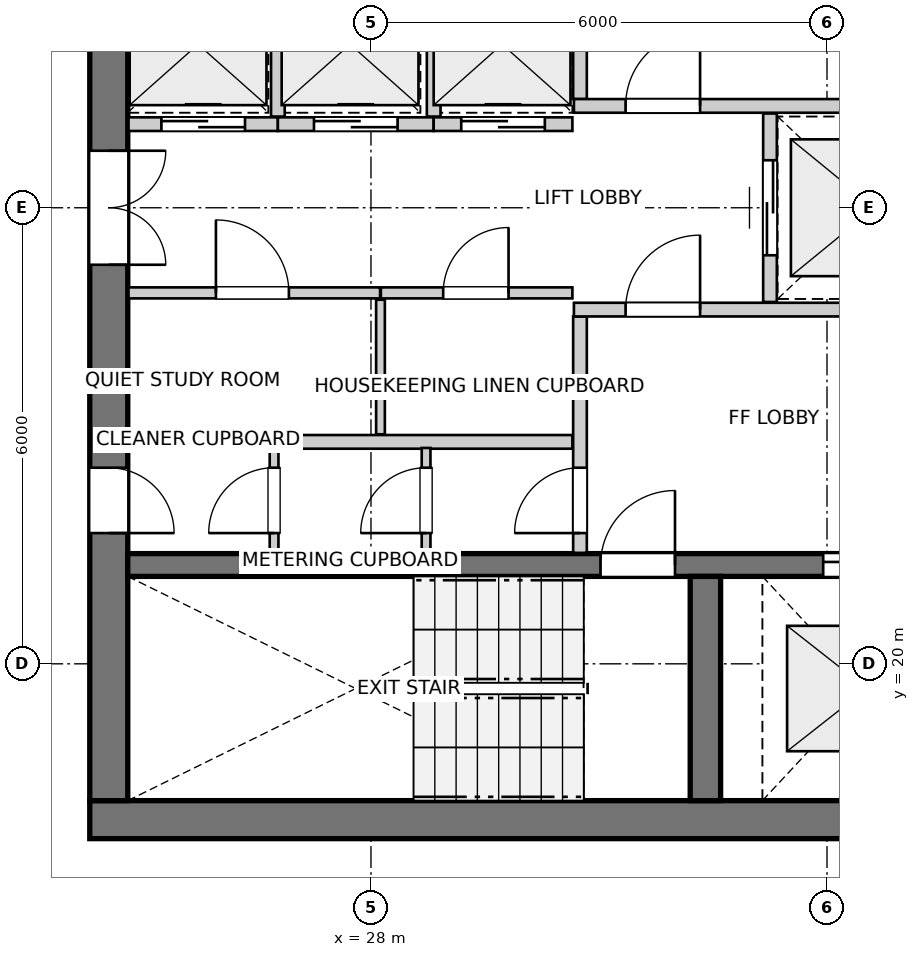
"""IFC4 building model, lengths in metres.
Left out: names, types, materials, properties, quantities, classifications, styles, units other than length and angle.
Written with IfcOpenShell. Run it as: python <this file> out.ifc"""

import sys

from ifc_helpers import new_model, si_unit, direction, frame, frame_2d, origin, place, context, subcontext, project, spatial, rectangle, extrude, source, transform, mapped, element, fill, save


model = new_model("IFC4")
c1 = context("Model", 3, precision=1e-05, world=origin(), true_north=direction((0.0, 1.0)))
c2 = subcontext(c1, "Body", "Model", "MODEL_VIEW")
j1 = project(units=[si_unit("LENGTHUNIT", "METRE"), si_unit("PLANEANGLEUNIT", "RADIAN")], contexts=[c1])
p1 = place(None, origin())
s1 = spatial("IfcSite", under=j1, at=p1, CompositionType="ELEMENT")
p2 = place(p1, origin())
s2 = spatial("IfcBuilding", under=s1, at=p2, CompositionType="ELEMENT")
p3 = place(p2, frame((0.0, 0.0, 246.8)))
s3 = spatial("IfcBuildingStorey", under=s2, at=p3, CompositionType="ELEMENT", Elevation=246.8)
p4 = place(p3, frame((24.3, 17.95, 0.0), z_axis=(0.0, 0.0, 1.0), x_axis=(1.0, 0.0, 0.0)))
e1 = element("IfcWall", 1, at=p4, inside=s3, PredefinedType="SHEAR", context=c2, shape_type="SweptSolid", body=[
    extrude(rectangle(XDim=12.1, YDim=0.5, at=frame_2d((6.05, 0.0))), origin(), (0.0, 0.0, 1.0), 2.96),
])
p5 = place(p3, frame((24.55, 33.8, 0.0), z_axis=(0.0, 0.0, 1.0), x_axis=(0.0, -1.0, 0.0)))
e2 = element("IfcWall", 2, at=p5, inside=s3, PredefinedType="SHEAR", context=c2, shape_type="SweptSolid", body=[
    extrude(rectangle(XDim=15.6, YDim=0.5, at=frame_2d((7.8, 0.0))), origin(), (0.0, 0.0, 1.0), 2.96),
])
p6 = place(p5, frame((7.05, 0.0, 0.0)))
e3 = element("IfcOpeningElement", 3, at=p6, cuts=e2, PredefinedType="OPENING", context=c2, shape_type="SweptSolid", body=[
    extrude(rectangle(XDim=1.5, YDim=2.15, at=frame_2d((0.75, 1.075))), frame((0.0, 0.26, 0.0), z_axis=(0.0, -1.0, 0.0), x_axis=(1.0, 0.0, 0.0)), (0.0, 0.0, 1.0), 0.52),
])
p7 = place(p5, frame((3.52, 0.0, 0.0)))
e4 = element("IfcOpeningElement", 4, at=p7, cuts=e2, PredefinedType="OPENING", context=c2, shape_type="SweptSolid", body=[
    extrude(rectangle(XDim=0.86, YDim=2.05, at=frame_2d((0.43, 1.025))), frame((0.0, 0.26, 0.0), z_axis=(0.0, -1.0, 0.0), x_axis=(1.0, 0.0, 0.0)), (0.0, 0.0, 1.0), 0.52),
])
p8 = place(p5, frame((11.22, 0.0, 0.0)))
e5 = element("IfcOpeningElement", 5, at=p8, cuts=e2, PredefinedType="OPENING", context=c2, shape_type="SweptSolid", body=[
    extrude(rectangle(XDim=0.86, YDim=2.05, at=frame_2d((0.43, 1.025))), frame((0.0, 0.26, 0.0), z_axis=(0.0, -1.0, 0.0), x_axis=(1.0, 0.0, 0.0)), (0.0, 0.0, 1.0), 0.52),
])
p9 = place(p3, frame((24.8, 21.3, 0.0), z_axis=(0.0, 0.0, 1.0), x_axis=(1.0, 0.0, 0.0)))
e6 = element("IfcWall", 6, at=p9, inside=s3, PredefinedType="SHEAR", context=c2, shape_type="SweptSolid", body=[
    extrude(rectangle(XDim=11.1, YDim=0.3, at=frame_2d((5.55, 0.0))), origin(), (0.0, 0.0, 1.0), 2.96),
])
p10 = place(p9, frame((6.22, 0.0, 0.0)))
e7 = element("IfcOpeningElement", 7, at=p10, cuts=e6, PredefinedType="OPENING", context=c2, shape_type="SweptSolid", body=[
    extrude(rectangle(XDim=0.98, YDim=2.15, at=frame_2d((0.49, 1.075))), frame((0.0, 0.16, 0.0), z_axis=(0.0, -1.0, 0.0), x_axis=(1.0, 0.0, 0.0)), (0.0, 0.0, 1.0), 0.32),
])
p11 = place(p9, frame((9.15, 0.0, 0.0)))
e8 = element("IfcOpeningElement", 8, at=p11, cuts=e6, PredefinedType="OPENING", context=c2, shape_type="SweptSolid", body=[
    extrude(rectangle(XDim=1.15, YDim=2.15, at=frame_2d((0.575, 1.075))), frame((0.0, 0.16, 0.0), z_axis=(0.0, -1.0, 0.0), x_axis=(1.0, 0.0, 0.0)), (0.0, 0.0, 1.0), 0.32),
])
p12 = place(p3, frame((32.4, 18.2, 0.0), z_axis=(0.0, 0.0, 1.0), x_axis=(0.0, 1.0, 0.0)))
e9 = element("IfcWall", 9, at=p12, inside=s3, PredefinedType="SHEAR", context=c2, shape_type="SweptSolid", body=[
    extrude(rectangle(XDim=2.95, YDim=0.4, at=frame_2d((1.475, 0.0))), origin(), (0.0, 0.0, 1.0), 2.96),
])
p13 = place(p3, frame((30.75, 21.46, 0.0), z_axis=(0.0, 0.0, 1.0), x_axis=(0.0, 1.0, 0.0)))
e10 = element("IfcWall", 10, at=p13, inside=s3, PredefinedType="PARTITIONING", context=c2, shape_type="SweptSolid", body=[
    extrude(rectangle(XDim=3.11, YDim=0.18, at=frame_2d((1.555, 0.0))), origin(), (0.0, 0.0, 1.0), 2.96),
])
p14 = place(p13, frame((0.26, 0.0, 0.0)))
e11 = element("IfcOpeningElement", 11, at=p14, cuts=e10, PredefinedType="OPENING", context=c2, shape_type="SweptSolid", body=[
    extrude(rectangle(XDim=0.86, YDim=2.05, at=frame_2d((0.43, 1.025))), frame((0.0, 0.1, 0.0), z_axis=(0.0, -1.0, 0.0), x_axis=(1.0, 0.0, 0.0)), (0.0, 0.0, 1.0), 0.2),
])
p15 = place(p3, frame((30.67, 24.66, 0.0), z_axis=(0.0, 0.0, 1.0), x_axis=(1.0, 0.0, 0.0)))
e12 = element("IfcWall", 12, at=p15, inside=s3, PredefinedType="PARTITIONING", context=c2, shape_type="SweptSolid", body=[
    extrude(rectangle(XDim=5.22, YDim=0.18, at=frame_2d((2.61, 0.0))), origin(), (0.0, 0.0, 1.0), 2.96),
])
p16 = place(p15, frame((0.68, 0.0, 0.0)))
e13 = element("IfcOpeningElement", 13, at=p16, cuts=e12, PredefinedType="OPENING", context=c2, shape_type="SweptSolid", body=[
    extrude(rectangle(XDim=0.98, YDim=2.15, at=frame_2d((0.49, 1.075))), frame((0.0, 0.1, 0.0), z_axis=(0.0, -1.0, 0.0), x_axis=(1.0, 0.0, 0.0)), (0.0, 0.0, 1.0), 0.2),
])
p17 = place(p3, frame((30.75, 27.43, 0.0), z_axis=(0.0, 0.0, 1.0), x_axis=(0.0, 1.0, 0.0)))
e14 = element("IfcWall", 14, at=p17, inside=s3, PredefinedType="PARTITIONING", context=c2, shape_type="SweptSolid", body=[
    extrude(rectangle(XDim=3.11, YDim=0.18, at=frame_2d((1.555, 0.0))), origin(), (0.0, 0.0, 1.0), 2.96),
])
p18 = place(p17, frame((1.98, 0.0, 0.0)))
e15 = element("IfcOpeningElement", 15, at=p18, cuts=e14, PredefinedType="OPENING", context=c2, shape_type="SweptSolid", body=[
    extrude(rectangle(XDim=0.86, YDim=2.05, at=frame_2d((0.43, 1.025))), frame((0.0, 0.1, 0.0), z_axis=(0.0, -1.0, 0.0), x_axis=(1.0, 0.0, 0.0)), (0.0, 0.0, 1.0), 0.2),
])
p19 = place(p3, frame((30.67, 27.34, 0.0), z_axis=(0.0, 0.0, 1.0), x_axis=(1.0, 0.0, 0.0)))
e16 = element("IfcWall", 16, at=p19, inside=s3, PredefinedType="PARTITIONING", context=c2, shape_type="SweptSolid", body=[
    extrude(rectangle(XDim=5.22, YDim=0.18, at=frame_2d((2.61, 0.0))), origin(), (0.0, 0.0, 1.0), 2.96),
])
p20 = place(p19, frame((0.68, 0.0, 0.0)))
e17 = element("IfcOpeningElement", 17, at=p20, cuts=e16, PredefinedType="OPENING", context=c2, shape_type="SweptSolid", body=[
    extrude(rectangle(XDim=0.98, YDim=2.15, at=frame_2d((0.49, 1.075))), frame((0.0, 0.1, 0.0), z_axis=(0.0, -1.0, 0.0), x_axis=(1.0, 0.0, 0.0)), (0.0, 0.0, 1.0), 0.2),
])
p21 = place(p3, frame((33.25, 24.76, 0.0), z_axis=(0.0, 0.0, 1.0), x_axis=(0.0, 1.0, 0.0)))
e18 = element("IfcWall", 18, at=p21, inside=s3, PredefinedType="PARTITIONING", context=c2, shape_type="SweptSolid", body=[
    extrude(rectangle(XDim=2.48, YDim=0.18, at=frame_2d((1.24, 0.0))), origin(), (0.0, 0.0, 1.0), 2.96),
])
p22 = place(p21, frame((0.615, 0.0, 0.0)))
e19 = element("IfcOpeningElement", 19, at=p22, cuts=e18, PredefinedType="OPENING", context=c2, shape_type="SweptSolid", body=[
    extrude(rectangle(XDim=1.25, YDim=2.15, at=frame_2d((0.625, 1.075))), frame((0.0, 0.1, 0.0), z_axis=(0.0, -1.0, 0.0), x_axis=(1.0, 0.0, 0.0)), (0.0, 0.0, 1.0), 0.2),
])
p23 = place(p3, frame((24.81, 22.92, 0.0), z_axis=(0.0, 0.0, 1.0), x_axis=(1.0, 0.0, 0.0)))
e20 = element("IfcWall", 20, at=p23, inside=s3, PredefinedType="PARTITIONING", context=c2, shape_type="SweptSolid", body=[
    extrude(rectangle(XDim=5.84, YDim=0.18, at=frame_2d((2.92, 0.0))), origin(), (0.0, 0.0, 1.0), 2.96),
])
p24 = place(p3, frame((24.81, 24.88, 0.0), z_axis=(0.0, 0.0, 1.0), x_axis=(1.0, 0.0, 0.0)))
e21 = element("IfcWall", 21, at=p24, inside=s3, PredefinedType="PARTITIONING", context=c2, shape_type="SweptSolid", body=[
    extrude(rectangle(XDim=3.31, YDim=0.145, at=frame_2d((1.655, 0.0))), origin(), (0.0, 0.0, 1.0), 2.96),
])
p25 = place(p24, frame((1.15, 0.0, 0.0)))
e22 = element("IfcOpeningElement", 22, at=p25, cuts=e21, PredefinedType="OPENING", context=c2, shape_type="SweptSolid", body=[
    extrude(rectangle(XDim=0.96, YDim=2.1, at=frame_2d((0.48, 1.05))), frame((0.0, 0.083, 0.0), z_axis=(0.0, -1.0, 0.0), x_axis=(1.0, 0.0, 0.0)), (0.0, 0.0, 1.0), 0.165),
])
p26 = place(p3, frame((28.13, 24.88, 0.0), z_axis=(0.0, 0.0, 1.0), x_axis=(1.0, 0.0, 0.0)))
e23 = element("IfcWall", 23, at=p26, inside=s3, PredefinedType="PARTITIONING", context=c2, shape_type="SweptSolid", body=[
    extrude(rectangle(XDim=2.52, YDim=0.145, at=frame_2d((1.26, 0.0))), origin(), (0.0, 0.0, 1.0), 2.96),
])
p27 = place(p26, frame((0.82, 0.0, 0.0)))
e24 = element("IfcOpeningElement", 24, at=p27, cuts=e23, PredefinedType="OPENING", context=c2, shape_type="SweptSolid", body=[
    extrude(rectangle(XDim=0.86, YDim=2.05, at=frame_2d((0.43, 1.025))), frame((0.0, 0.083, 0.0), z_axis=(0.0, -1.0, 0.0), x_axis=(1.0, 0.0, 0.0)), (0.0, 0.0, 1.0), 0.165),
])
p28 = place(p3, frame((28.125, 23.02, 0.0), z_axis=(0.0, 0.0, 1.0), x_axis=(0.0, 1.0, 0.0)))
e25 = element("IfcWall", 25, at=p28, inside=s3, PredefinedType="PARTITIONING", context=c2, shape_type="SweptSolid", body=[
    extrude(rectangle(XDim=1.77, YDim=0.115, at=frame_2d((0.885, 0.0))), origin(), (0.0, 0.0, 1.0), 2.96),
])
p29 = place(p3, frame((24.81, 27.1, 0.0), z_axis=(0.0, 0.0, 1.0), x_axis=(1.0, 0.0, 0.0)))
e26 = element("IfcWall", 26, at=p29, inside=s3, PredefinedType="PARTITIONING", context=c2, shape_type="SweptSolid", body=[
    extrude(rectangle(XDim=1.965, YDim=0.18, at=frame_2d((0.982, 0.0))), origin(), (0.0, 0.0, 1.0), 2.96),
])
p30 = place(p29, frame((0.433, 0.0, 0.0)))
e27 = element("IfcOpeningElement", 27, at=p30, cuts=e26, PredefinedType="OPENING", context=c2, shape_type="SweptSolid", body=[
    extrude(rectangle(XDim=1.1, YDim=2.15, at=frame_2d((0.55, 1.075))), frame((0.0, 0.1, 0.0), z_axis=(0.0, -1.0, 0.0), x_axis=(1.0, 0.0, 0.0)), (0.0, 0.0, 1.0), 0.2),
])
p31 = place(p3, frame((26.775, 27.1, 0.0), z_axis=(0.0, 0.0, 1.0), x_axis=(1.0, 0.0, 0.0)))
e28 = element("IfcWall", 28, at=p31, inside=s3, PredefinedType="PARTITIONING", context=c2, shape_type="SweptSolid", body=[
    extrude(rectangle(XDim=2.05, YDim=0.18, at=frame_2d((1.025, 0.0))), origin(), (0.0, 0.0, 1.0), 2.96),
])
p32 = place(p31, frame((0.475, 0.0, 0.0)))
e29 = element("IfcOpeningElement", 29, at=p32, cuts=e28, PredefinedType="OPENING", context=c2, shape_type="SweptSolid", body=[
    extrude(rectangle(XDim=1.1, YDim=2.15, at=frame_2d((0.55, 1.075))), frame((0.0, 0.1, 0.0), z_axis=(0.0, -1.0, 0.0), x_axis=(1.0, 0.0, 0.0)), (0.0, 0.0, 1.0), 0.2),
])
p33 = place(p3, frame((26.775, 27.2, 0.0), z_axis=(0.0, 0.0, 1.0), x_axis=(0.0, 1.0, 0.0)))
e30 = element("IfcWall", 30, at=p33, inside=s3, PredefinedType="PARTITIONING", context=c2, shape_type="SweptSolid", body=[
    extrude(rectangle(XDim=1.78, YDim=0.18, at=frame_2d((0.89, 0.0))), origin(), (0.0, 0.0, 1.0), 2.96),
])
p34 = place(p3, frame((28.825, 27.1, 0.0), z_axis=(0.0, 0.0, 1.0), x_axis=(1.0, 0.0, 0.0)))
e31 = element("IfcWall", 31, at=p34, inside=s3, PredefinedType="PARTITIONING", context=c2, shape_type="SweptSolid", body=[
    extrude(rectangle(XDim=1.825, YDim=0.18, at=frame_2d((0.913, 0.0))), origin(), (0.0, 0.0, 1.0), 2.96),
])
p35 = place(p34, frame((0.363, 0.0, 0.0)))
e32 = element("IfcOpeningElement", 32, at=p35, cuts=e31, PredefinedType="OPENING", context=c2, shape_type="SweptSolid", body=[
    extrude(rectangle(XDim=1.1, YDim=2.15, at=frame_2d((0.55, 1.075))), frame((0.0, 0.1, 0.0), z_axis=(0.0, -1.0, 0.0), x_axis=(1.0, 0.0, 0.0)), (0.0, 0.0, 1.0), 0.2),
])
p36 = place(p3, frame((28.825, 27.2, 0.0), z_axis=(0.0, 0.0, 1.0), x_axis=(0.0, 1.0, 0.0)))
e33 = element("IfcWall", 33, at=p36, inside=s3, PredefinedType="PARTITIONING", context=c2, shape_type="SweptSolid", body=[
    extrude(rectangle(XDim=1.78, YDim=0.18, at=frame_2d((0.89, 0.0))), origin(), (0.0, 0.0, 1.0), 2.96),
])
p37 = place(p3, frame((26.725, 21.46, 0.0), z_axis=(0.0, 0.0, 1.0), x_axis=(0.0, 1.0, 0.0)))
e34 = element("IfcWall", 34, at=p37, inside=s3, PredefinedType="PARTITIONING", context=c2, shape_type="SweptSolid", body=[
    extrude(rectangle(XDim=1.38, YDim=0.115, at=frame_2d((0.69, 0.0))), origin(), (0.0, 0.0, 1.0), 2.96),
])
p38 = place(p37, frame((0.26, 0.0, 0.0)))
e35 = element("IfcOpeningElement", 35, at=p38, cuts=e34, PredefinedType="OPENING", context=c2, shape_type="SweptSolid", body=[
    extrude(rectangle(XDim=0.86, YDim=2.05, at=frame_2d((0.43, 1.025))), frame((0.0, 0.067, 0.0), z_axis=(0.0, -1.0, 0.0), x_axis=(1.0, 0.0, 0.0)), (0.0, 0.0, 1.0), 0.135),
])
p39 = place(p3, frame((28.725, 21.46, 0.0), z_axis=(0.0, 0.0, 1.0), x_axis=(0.0, 1.0, 0.0)))
e36 = element("IfcWall", 36, at=p39, inside=s3, PredefinedType="PARTITIONING", context=c2, shape_type="SweptSolid", body=[
    extrude(rectangle(XDim=1.38, YDim=0.115, at=frame_2d((0.69, 0.0))), origin(), (0.0, 0.0, 1.0), 2.96),
])
p40 = place(p39, frame((0.26, 0.0, 0.0)))
e37 = element("IfcOpeningElement", 37, at=p40, cuts=e36, PredefinedType="OPENING", context=c2, shape_type="SweptSolid", body=[
    extrude(rectangle(XDim=0.86, YDim=2.05, at=frame_2d((0.43, 1.025))), frame((0.0, 0.067, 0.0), z_axis=(0.0, -1.0, 0.0), x_axis=(1.0, 0.0, 0.0)), (0.0, 0.0, 1.0), 0.135),
])
m1 = source(origin(), c2, "Body", "SweptSolid", [
    extrude(rectangle(XDim=0.98, YDim=2.15, at=frame_2d((0.49, 1.075))), frame((0.0, 0.025, 0.0), z_axis=(0.0, -1.0, 0.0), x_axis=(1.0, 0.0, 0.0)), (0.0, 0.0, 1.0), 0.05),
])
p41 = place(p10, origin())
e38 = element("IfcDoor", 38, at=p41, inside=s3, OperationType="SINGLE_SWING_RIGHT", PredefinedType="DOOR", context=c2, shape_type="MappedRepresentation", body=[
    mapped(m1, transform((0.0, 0.0, 0.0), x_axis=(1.0, 0.0, 0.0), y_axis=(0.0, 1.0, 0.0), z_axis=(0.0, 0.0, 1.0), scale=1.0)),
])
fill(e7, e38)
m2 = source(origin(), c2, "Body", "SweptSolid", [
    extrude(rectangle(XDim=1.15, YDim=2.15, at=frame_2d((0.575, 1.075))), frame((0.0, 0.025, 0.0), z_axis=(0.0, -1.0, 0.0), x_axis=(1.0, 0.0, 0.0)), (0.0, 0.0, 1.0), 0.05),
])
p42 = place(p11, origin())
e39 = element("IfcDoor", 39, at=p42, inside=s3, OperationType="DOUBLE_DOOR_SLIDING", PredefinedType="DOOR", context=c2, shape_type="MappedRepresentation", body=[
    mapped(m2, transform((0.0, 0.0, 0.0), x_axis=(1.0, 0.0, 0.0), y_axis=(0.0, 1.0, 0.0), z_axis=(0.0, 0.0, 1.0), scale=1.0)),
])
fill(e8, e39)
m3 = source(origin(), c2, "Body", "SweptSolid", [
    extrude(rectangle(XDim=1.5, YDim=2.15, at=frame_2d((0.75, 1.075))), frame((0.0, 0.025, 0.0), z_axis=(0.0, -1.0, 0.0), x_axis=(1.0, 0.0, 0.0)), (0.0, 0.0, 1.0), 0.05),
])
p43 = place(p6, origin())
e40 = element("IfcDoor", 40, at=p43, inside=s3, OperationType="DOUBLE_DOOR_SINGLE_SWING", PredefinedType="DOOR", context=c2, shape_type="MappedRepresentation", body=[
    mapped(m3, transform((0.0, 0.0, 0.0), x_axis=(1.0, 0.0, 0.0), y_axis=(0.0, 1.0, 0.0), z_axis=(0.0, 0.0, 1.0), scale=1.0)),
])
fill(e3, e40)
m4 = source(origin(), c2, "Body", "SweptSolid", [
    extrude(rectangle(XDim=0.86, YDim=2.05, at=frame_2d((0.43, 1.025))), frame((0.0, 0.025, 0.0), z_axis=(0.0, -1.0, 0.0), x_axis=(1.0, 0.0, 0.0)), (0.0, 0.0, 1.0), 0.05),
])
p44 = place(p8, origin())
e41 = element("IfcDoor", 41, at=p44, inside=s3, OperationType="SINGLE_SWING_RIGHT", PredefinedType="DOOR", context=c2, shape_type="MappedRepresentation", body=[
    mapped(m4, transform((0.0, 0.0, 0.0), x_axis=(1.0, 0.0, 0.0), y_axis=(0.0, 1.0, 0.0), z_axis=(0.0, 0.0, 1.0), scale=1.0)),
])
fill(e5, e41)
p45 = place(p14, origin())
e42 = element("IfcDoor", 42, at=p45, inside=s3, OperationType="SINGLE_SWING_LEFT", PredefinedType="DOOR", context=c2, shape_type="MappedRepresentation", body=[
    mapped(m4, transform((0.0, 0.0, 0.0), x_axis=(1.0, 0.0, 0.0), y_axis=(0.0, 1.0, 0.0), z_axis=(0.0, 0.0, 1.0), scale=1.0)),
])
fill(e11, e42)
p46 = place(p16, origin())
e43 = element("IfcDoor", 43, at=p46, inside=s3, OperationType="SINGLE_SWING_RIGHT", PredefinedType="DOOR", context=c2, shape_type="MappedRepresentation", body=[
    mapped(m1, transform((0.0, 0.0, 0.0), x_axis=(1.0, 0.0, 0.0), y_axis=(0.0, 1.0, 0.0), z_axis=(0.0, 0.0, 1.0), scale=1.0)),
])
fill(e13, e43)
p47 = place(p20, origin())
e44 = element("IfcDoor", 44, at=p47, inside=s3, OperationType="SINGLE_SWING_RIGHT", PredefinedType="DOOR", context=c2, shape_type="MappedRepresentation", body=[
    mapped(m1, transform((0.0, 0.0, 0.0), x_axis=(1.0, 0.0, 0.0), y_axis=(0.0, 1.0, 0.0), z_axis=(0.0, 0.0, 1.0), scale=1.0)),
])
fill(e17, e44)
m5 = source(origin(), c2, "Body", "SweptSolid", [
    extrude(rectangle(XDim=1.25, YDim=2.15, at=frame_2d((0.625, 1.075))), frame((0.0, 0.025, 0.0), z_axis=(0.0, -1.0, 0.0), x_axis=(1.0, 0.0, 0.0)), (0.0, 0.0, 1.0), 0.05),
])
p48 = place(p22, origin())
e45 = element("IfcDoor", 45, at=p48, inside=s3, OperationType="DOUBLE_DOOR_SLIDING", PredefinedType="DOOR", context=c2, shape_type="MappedRepresentation", body=[
    mapped(m5, transform((0.0, 0.0, 0.0), x_axis=(1.0, 0.0, 0.0), y_axis=(0.0, 1.0, 0.0), z_axis=(0.0, 0.0, 1.0), scale=1.0)),
])
fill(e19, e45)
m6 = source(origin(), c2, "Body", "SweptSolid", [
    extrude(rectangle(XDim=0.96, YDim=2.1, at=frame_2d((0.48, 1.05))), frame((0.0, 0.025, 0.0), z_axis=(0.0, -1.0, 0.0), x_axis=(1.0, 0.0, 0.0)), (0.0, 0.0, 1.0), 0.05),
])
p49 = place(p25, origin())
e46 = element("IfcDoor", 46, at=p49, inside=s3, OperationType="SINGLE_SWING_LEFT", PredefinedType="DOOR", context=c2, shape_type="MappedRepresentation", body=[
    mapped(m6, transform((0.0, 0.0, 0.0), x_axis=(1.0, 0.0, 0.0), y_axis=(0.0, 1.0, 0.0), z_axis=(0.0, 0.0, 1.0), scale=1.0)),
])
fill(e22, e46)
p50 = place(p27, origin())
e47 = element("IfcDoor", 47, at=p50, inside=s3, OperationType="SINGLE_SWING_RIGHT", PredefinedType="DOOR", context=c2, shape_type="MappedRepresentation", body=[
    mapped(m4, transform((0.0, 0.0, 0.0), x_axis=(1.0, 0.0, 0.0), y_axis=(0.0, 1.0, 0.0), z_axis=(0.0, 0.0, 1.0), scale=1.0)),
])
fill(e24, e47)
m7 = source(origin(), c2, "Body", "SweptSolid", [
    extrude(rectangle(XDim=1.1, YDim=2.15, at=frame_2d((0.55, 1.075))), frame((0.0, 0.025, 0.0), z_axis=(0.0, -1.0, 0.0), x_axis=(1.0, 0.0, 0.0)), (0.0, 0.0, 1.0), 0.05),
])
p51 = place(p30, origin())
e48 = element("IfcDoor", 48, at=p51, inside=s3, OperationType="DOUBLE_DOOR_SLIDING", PredefinedType="DOOR", context=c2, shape_type="MappedRepresentation", body=[
    mapped(m7, transform((0.0, 0.0, 0.0), x_axis=(1.0, 0.0, 0.0), y_axis=(0.0, 1.0, 0.0), z_axis=(0.0, 0.0, 1.0), scale=1.0)),
])
fill(e27, e48)
p52 = place(p32, origin())
e49 = element("IfcDoor", 49, at=p52, inside=s3, OperationType="DOUBLE_DOOR_SLIDING", PredefinedType="DOOR", context=c2, shape_type="MappedRepresentation", body=[
    mapped(m7, transform((0.0, 0.0, 0.0), x_axis=(1.0, 0.0, 0.0), y_axis=(0.0, 1.0, 0.0), z_axis=(0.0, 0.0, 1.0), scale=1.0)),
])
fill(e29, e49)
p53 = place(p35, origin())
e50 = element("IfcDoor", 50, at=p53, inside=s3, OperationType="DOUBLE_DOOR_SLIDING", PredefinedType="DOOR", context=c2, shape_type="MappedRepresentation", body=[
    mapped(m7, transform((0.0, 0.0, 0.0), x_axis=(1.0, 0.0, 0.0), y_axis=(0.0, 1.0, 0.0), z_axis=(0.0, 0.0, 1.0), scale=1.0)),
])
fill(e32, e50)
p54 = place(p38, origin())
e51 = element("IfcDoor", 51, at=p54, inside=s3, OperationType="SINGLE_SWING_LEFT", PredefinedType="DOOR", context=c2, shape_type="MappedRepresentation", body=[
    mapped(m4, transform((0.0, 0.0, 0.0), x_axis=(1.0, 0.0, 0.0), y_axis=(0.0, 1.0, 0.0), z_axis=(0.0, 0.0, 1.0), scale=1.0)),
])
fill(e35, e51)
p55 = place(p40, origin())
e52 = element("IfcDoor", 52, at=p55, inside=s3, OperationType="SINGLE_SWING_LEFT", PredefinedType="DOOR", context=c2, shape_type="MappedRepresentation", body=[
    mapped(m4, transform((0.0, 0.0, 0.0), x_axis=(1.0, 0.0, 0.0), y_axis=(0.0, 1.0, 0.0), z_axis=(0.0, 0.0, 1.0), scale=1.0)),
])
fill(e37, e52)
save(model, sys.argv[1])
